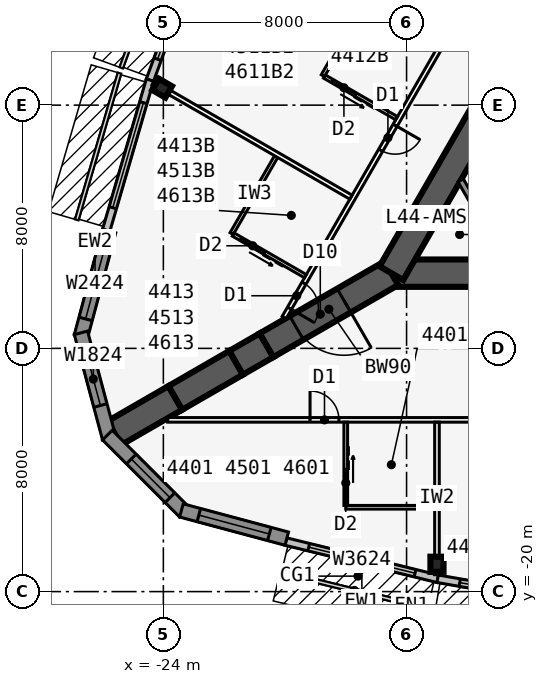
"""IFC4 building model, lengths in metres.
Left out: names, types, materials, properties, quantities, classifications, styles, units other than length and angle.
Written with IfcOpenShell. Run it as: python <this file> out.ifc"""

import sys

from ifc_helpers import new_model, si_unit, direction, frame, frame_2d, origin, origin_2d, place, context, subcontext, project, spatial, polyline, rectangle, i_section, outline, extrude, element, fill, save


model = new_model("IFC4")
c1 = context("Model", 3, precision=1e-05, world=origin(), true_north=direction((0.0, 1.0)))
c2 = subcontext(c1, "Body", "Model", "MODEL_VIEW")
j1 = project(units=[si_unit("LENGTHUNIT", "METRE"), si_unit("PLANEANGLEUNIT", "RADIAN")], contexts=[c1])
p1 = place(None, origin())
s1 = spatial("IfcSite", under=j1, at=p1, CompositionType="ELEMENT")
p2 = place(p1, origin())
s2 = spatial("IfcBuilding", under=s1, at=p2, CompositionType="ELEMENT")
p3 = place(p2, frame((0.0, 0.0, 165.7)))
s3 = spatial("IfcBuildingStorey", under=s2, at=p3, CompositionType="ELEMENT", Elevation=165.7)
p4 = place(p3, frame((-16.5, -9.526, 0.0), z_axis=(0.0, 0.0, 1.0), x_axis=(1.0, 0.0, 0.0)))
e1 = element("IfcWall", 1, at=p4, inside=s3, PredefinedType="SHEAR", context=c2, shape_type="SweptSolid", body=[
    extrude(rectangle(XDim=33.0, YDim=0.9, at=frame_2d((16.5, 0.0))), origin(), (0.0, 0.0, 1.0), 3.4),
])
p5 = place(p4, frame((14.05, 0.0, 0.0)))
e2 = element("IfcOpeningElement", 2, at=p5, cuts=e1, PredefinedType="OPENING", context=c2, shape_type="SweptSolid", body=[
    extrude(rectangle(XDim=1.8, YDim=2.13, at=frame_2d((0.9, 1.065))), frame((0.0, 0.46, 0.0), z_axis=(0.0, -1.0, 0.0), x_axis=(1.0, 0.0, 0.0)), (0.0, 0.0, 1.0), 0.92),
])
p6 = place(p3, frame((0.0, 19.052, 0.0), z_axis=(0.0, 0.0, 1.0), x_axis=(-0.499999749417, -0.866025548458, 0.0)))
e3 = element("IfcWall", 3, at=p6, inside=s3, PredefinedType="SHEAR", context=c2, shape_type="SweptSolid", body=[
    extrude(rectangle(XDim=33.0, YDim=0.9, at=frame_2d((16.5, 0.0))), origin(), (0.0, 0.0, 1.0), 3.4),
])
p7 = place(p6, frame((14.15, 0.0, 0.0)))
e4 = element("IfcOpeningElement", 4, at=p7, cuts=e3, PredefinedType="OPENING", context=c2, shape_type="SweptSolid", body=[
    extrude(rectangle(XDim=1.8, YDim=2.13, at=frame_2d((0.9, 1.065))), frame((0.0, 0.46, 0.0), z_axis=(0.0, -1.0, 0.0), x_axis=(1.0, 0.0, 0.0)), (0.0, 0.0, 1.0), 0.92),
])
p8 = place(p6, frame((12.6, 0.0, 0.0)))
e5 = element("IfcOpeningElement", 5, at=p8, cuts=e3, PredefinedType="OPENING", context=c2, shape_type="SweptSolid", body=[
    extrude(rectangle(XDim=1.0, YDim=2.13, at=frame_2d((0.5, 1.065))), frame((0.0, 0.46, 0.0), z_axis=(0.0, -1.0, 0.0), x_axis=(1.0, 0.0, 0.0)), (0.0, 0.0, 1.0), 0.92),
])
p9 = place(p3, frame((-16.5, -9.526, 0.0), z_axis=(0.0, 0.0, 1.0), x_axis=(-0.866031398331, -0.499989616998, 0.0)))
e6 = element("IfcWall", 6, at=p9, inside=s3, PredefinedType="SHEAR", context=c2, shape_type="SweptSolid", body=[
    extrude(rectangle(XDim=4.746, YDim=0.9, at=frame_2d((2.373, 0.0))), origin(), (0.0, 0.0, 1.0), 3.4),
])
p10 = place(p9, frame((1.8, 0.0, 0.0)))
e7 = element("IfcOpeningElement", 7, at=p10, cuts=e6, PredefinedType="OPENING", context=c2, shape_type="SweptSolid", body=[
    extrude(rectangle(XDim=1.8, YDim=2.13, at=frame_2d((0.9, 1.065))), frame((0.0, 0.46, 0.0), z_axis=(0.0, -1.0, 0.0), x_axis=(1.0, 0.0, 0.0)), (0.0, 0.0, 1.0), 0.92),
])
p11 = place(p3, frame((-20.61, -11.899, 0.0), z_axis=(0.0, 0.0, 1.0), x_axis=(-0.866009537788, -0.500027479704, 0.0)))
e8 = element("IfcWall", 8, at=p11, inside=s3, PredefinedType="SHEAR", context=c2, shape_type="SweptSolid", body=[
    extrude(rectangle(XDim=1.155, YDim=0.9, at=frame_2d((0.577, 0.0))), origin(), (0.0, 0.0, 1.0), 3.4),
])
for number, where, z_axis, x_axis in (
    (9, (-21.61, -12.477, 0.0), (0.0, 0.0, 1.0), (-0.866, -0.5, 0.0)),
    (10, (-23.61, -13.631, 0.0), (0.0, 0.0, 1.0), (-0.866, -0.5, 0.0)),
):
    element("IfcWall", number, at=place(p3, frame(where, z_axis=z_axis, x_axis=x_axis)), inside=s3, PredefinedType="SHEAR", context=c2, shape_type="SweptSolid", body=[
        extrude(rectangle(XDim=2.309, YDim=0.9, at=frame_2d((1.155, 0.0))), origin(), (0.0, 0.0, 1.0), 3.4),
    ])
for number, where, z_axis, x_axis in (
    (11, (-15.0, -19.1, 0.0), (0.0, 0.0, 1.0), (1.0, 0.0, 0.0)),
    (12, (-24.041, -3.44, 0.0), (0.0, 0.0, 1.0), (-0.5, -0.866, 0.0)),
):
    element("IfcColumn", number, at=place(p3, frame(where, z_axis=z_axis, x_axis=x_axis)), inside=s3, PredefinedType="COLUMN", context=c2, shape_type="SweptSolid", body=[
        extrude(i_section(OverallWidth=0.432, OverallDepth=0.498, WebThickness=0.056, FlangeThickness=0.089, at=origin_2d()), origin(), (0.0, 0.0, 1.0), 3.4),
    ])
p12 = place(p3, frame((-19.97, -18.354, 0.0), z_axis=(0.0, 0.0, 1.0), x_axis=(0.971270024053, -0.237980126011, 0.0)))
e13 = element("IfcWall", 13, at=p12, inside=s3, PredefinedType="STANDARD", context=c2, shape_type="SweptSolid", body=[
    extrude(rectangle(XDim=5.148, YDim=0.25, at=frame_2d((2.574, 0.0))), origin(), (0.0, 0.0, 1.0), 3.235),
])
p13 = place(p12, frame((0.774, 0.0, 0.45)))
e14 = element("IfcOpeningElement", 14, at=p13, cuts=e13, PredefinedType="OPENING", context=c2, shape_type="SweptSolid", body=[
    extrude(rectangle(XDim=3.6, YDim=2.4, at=frame_2d((1.8, 1.2))), frame((0.0, 0.135, 0.0), z_axis=(0.0, -1.0, 0.0), x_axis=(1.0, 0.0, 0.0)), (0.0, 0.0, 1.0), 0.27),
])
p14 = place(p3, frame((-14.979, -19.577, 0.0), z_axis=(0.0, 0.0, 1.0), x_axis=(0.985030467156, -0.172380331752, 0.0)))
e15 = element("IfcWall", 15, at=p14, inside=s3, PredefinedType="STANDARD", context=c2, shape_type="SweptSolid", body=[
    extrude(rectangle(XDim=5.076, YDim=0.25, at=frame_2d((2.538, 0.0))), origin(), (0.0, 0.0, 1.0), 3.235),
])
p15 = place(p14, frame((0.738, 0.0, 0.45)))
e16 = element("IfcOpeningElement", 16, at=p15, cuts=e15, PredefinedType="OPENING", context=c2, shape_type="SweptSolid", body=[
    extrude(rectangle(XDim=3.6, YDim=2.4, at=frame_2d((1.8, 1.2))), frame((0.0, 0.135, 0.0), z_axis=(0.0, -1.0, 0.0), x_axis=(1.0, 0.0, 0.0)), (0.0, 0.0, 1.0), 0.27),
])
p16 = place(p3, frame((-22.701, 1.584, 0.0), z_axis=(0.0, 0.0, 1.0), x_axis=(-0.343225593282, -0.939252996863, 0.0)))
e17 = element("IfcWall", 17, at=p16, inside=s3, PredefinedType="STANDARD", context=c2, shape_type="SweptSolid", body=[
    extrude(rectangle(XDim=5.076, YDim=0.25, at=frame_2d((2.538, 0.0))), origin(), (0.0, 0.0, 1.0), 3.235),
])
p17 = place(p16, frame((0.738, 0.0, 0.45)))
e18 = element("IfcOpeningElement", 18, at=p17, cuts=e17, PredefinedType="OPENING", context=c2, shape_type="SweptSolid", body=[
    extrude(rectangle(XDim=3.6, YDim=2.4, at=frame_2d((1.8, 1.2))), frame((0.0, 0.135, 0.0), z_axis=(0.0, -1.0, 0.0), x_axis=(1.0, 0.0, 0.0)), (0.0, 0.0, 1.0), 0.27),
])
p18 = place(p3, frame((-24.441, -3.175, 0.0), z_axis=(0.0, 0.0, 1.0), x_axis=(-0.279528287117, -0.960137457191, 0.0)))
e19 = element("IfcWall", 19, at=p18, inside=s3, PredefinedType="STANDARD", context=c2, shape_type="SweptSolid", body=[
    extrude(rectangle(XDim=5.148, YDim=0.25, at=frame_2d((2.574, 0.0))), origin(), (0.0, 0.0, 1.0), 3.235),
])
p19 = place(p18, frame((0.774, 0.0, 0.45)))
e20 = element("IfcOpeningElement", 20, at=p19, cuts=e19, PredefinedType="OPENING", context=c2, shape_type="SweptSolid", body=[
    extrude(rectangle(XDim=3.6, YDim=2.4, at=frame_2d((1.8, 1.2))), frame((0.0, 0.135, 0.0), z_axis=(0.0, -1.0, 0.0), x_axis=(1.0, 0.0, 0.0)), (0.0, 0.0, 1.0), 0.27),
])
p20 = place(p3, frame((-25.783, -8.141, 0.0), z_axis=(0.0, 0.0, 1.0), x_axis=(-0.258823421857, -0.965924653531, 0.0)))
e21 = element("IfcWall", 21, at=p20, inside=s3, PredefinedType="SOLIDWALL", context=c2, shape_type="SweptSolid", body=[
    extrude(rectangle(XDim=3.586, YDim=0.45, at=frame_2d((1.793, 0.0))), origin(), (0.0, 0.0, 1.0), 3.235),
])
p21 = place(p20, frame((0.593, 0.0, 0.45)))
e22 = element("IfcOpeningElement", 22, at=p21, cuts=e21, PredefinedType="OPENING", context=c2, shape_type="SweptSolid", body=[
    extrude(rectangle(XDim=2.4, YDim=2.4, at=frame_2d((1.2, 1.2))), frame((0.0, 0.235, 0.0), z_axis=(0.0, -1.0, 0.0), x_axis=(1.0, 0.0, 0.0)), (0.0, 0.0, 1.0), 0.47),
])
p22 = place(p3, frame((-26.711, -11.489, 0.0), z_axis=(0.0, 0.0, 1.0), x_axis=(0.258823421857, -0.965924653531, 0.0)))
e23 = element("IfcWall", 23, at=p22, inside=s3, PredefinedType="SOLIDWALL", context=c2, shape_type="SweptSolid", body=[
    extrude(outline(polyline([(3.586, 0.225), (3.527, 0.225), (3.035, 0.093), (3.0, 0.225), (0.0, 0.225), (0.0, -0.225), (3.586, -0.225), (3.586, 0.225)])), origin(), (0.0, 0.0, 1.0), 3.235),
])
p23 = place(p22, frame((0.675, 0.0, 0.45)))
e24 = element("IfcOpeningElement", 24, at=p23, cuts=e23, PredefinedType="OPENING", context=c2, shape_type="SweptSolid", body=[
    extrude(rectangle(XDim=1.8, YDim=2.4, at=frame_2d((0.9, 1.2))), frame((0.0, 0.235, 0.0), z_axis=(0.0, -1.0, 0.0), x_axis=(1.0, 0.0, 0.0)), (0.0, 0.0, 1.0), 0.47),
])
p24 = place(p3, frame((-25.841, -14.852, 0.0), z_axis=(0.0, 0.0, 1.0), x_axis=(0.707106781187, -0.707106781187, 0.0)))
e25 = element("IfcWall", 25, at=p24, inside=s3, PredefinedType="SOLIDWALL", context=c2, shape_type="SweptSolid", body=[
    extrude(outline(polyline([(3.586, 0.225), (0.586, 0.225), (0.551, 0.093), (0.059, 0.225), (0.0, 0.225), (0.0, -0.225), (3.586, -0.225), (3.586, 0.225)])), origin(), (0.0, 0.0, 1.0), 3.235),
])
p25 = place(p24, frame((1.111, 0.0, 0.45)))
e26 = element("IfcOpeningElement", 26, at=p25, cuts=e25, PredefinedType="OPENING", context=c2, shape_type="SweptSolid", body=[
    extrude(rectangle(XDim=1.8, YDim=2.4, at=frame_2d((0.9, 1.2))), frame((0.0, 0.235, 0.0), z_axis=(0.0, -1.0, 0.0), x_axis=(1.0, 0.0, 0.0)), (0.0, 0.0, 1.0), 0.47),
])
p26 = place(p3, frame((-23.406, -17.33, 0.0), z_axis=(0.0, 0.0, 1.0), x_axis=(0.965924653531, -0.258823421857, 0.0)))
e27 = element("IfcWall", 27, at=p26, inside=s3, PredefinedType="SOLIDWALL", context=c2, shape_type="SweptSolid", body=[
    extrude(rectangle(XDim=3.586, YDim=0.45, at=frame_2d((1.793, 0.0))), origin(), (0.0, 0.0, 1.0), 3.235),
])
p27 = place(p26, frame((0.593, 0.0, 0.45)))
e28 = element("IfcOpeningElement", 28, at=p27, cuts=e27, PredefinedType="OPENING", context=c2, shape_type="SweptSolid", body=[
    extrude(rectangle(XDim=2.4, YDim=2.4, at=frame_2d((1.2, 1.2))), frame((0.0, 0.235, 0.0), z_axis=(0.0, -1.0, 0.0), x_axis=(1.0, 0.0, 0.0)), (0.0, 0.0, 1.0), 0.47),
])
p28 = place(p3, frame((-23.857, -14.351, 0.0), z_axis=(0.0, 0.0, 1.0), x_axis=(1.0, 0.0, 0.0)))
e29 = element("IfcWall", 29, at=p28, inside=s3, PredefinedType="PARTITIONING", context=c2, shape_type="SweptSolid", body=[
    extrude(rectangle(XDim=47.714, YDim=0.15, at=frame_2d((23.857, 0.0))), origin(), (0.0, 0.0, 1.0), 3.235),
])
p29 = place(p28, frame((4.682, 0.0, 0.0)))
e30 = element("IfcOpeningElement", 30, at=p29, cuts=e29, PredefinedType="OPENING", context=c2, shape_type="SweptSolid", body=[
    extrude(rectangle(XDim=0.95, YDim=2.13, at=frame_2d((0.475, 1.065))), frame((0.0, 0.085, 0.0), z_axis=(0.0, -1.0, 0.0), x_axis=(1.0, 0.0, 0.0)), (0.0, 0.0, 1.0), 0.17),
])
p30 = place(p28, frame((11.382, 0.0, 0.0)))
e31 = element("IfcOpeningElement", 31, at=p30, cuts=e29, PredefinedType="OPENING", context=c2, shape_type="SweptSolid", body=[
    extrude(rectangle(XDim=0.95, YDim=2.13, at=frame_2d((0.475, 1.065))), frame((0.0, 0.085, 0.0), z_axis=(0.0, -1.0, 0.0), x_axis=(1.0, 0.0, 0.0)), (0.0, 0.0, 1.0), 0.17),
])
p31 = place(p28, frame((23.357, 0.0, 0.0)))
e32 = element("IfcOpeningElement", 32, at=p31, cuts=e29, PredefinedType="OPENING", context=c2, shape_type="SweptSolid", body=[
    extrude(rectangle(XDim=1.0, YDim=2.13, at=frame_2d((0.5, 1.065))), frame((0.0, 0.085, 0.0), z_axis=(0.0, -1.0, 0.0), x_axis=(1.0, 0.0, 0.0)), (0.0, 0.0, 1.0), 0.17),
])
p32 = place(p28, frame((30.082, 0.0, 0.0)))
e33 = element("IfcOpeningElement", 33, at=p32, cuts=e29, PredefinedType="OPENING", context=c2, shape_type="SweptSolid", body=[
    extrude(rectangle(XDim=0.95, YDim=2.13, at=frame_2d((0.475, 1.065))), frame((0.0, 0.085, 0.0), z_axis=(0.0, -1.0, 0.0), x_axis=(1.0, 0.0, 0.0)), (0.0, 0.0, 1.0), 0.17),
])
p33 = place(p28, frame((43.041, 0.0, 0.0)))
e34 = element("IfcOpeningElement", 34, at=p33, cuts=e29, PredefinedType="OPENING", context=c2, shape_type="SweptSolid", body=[
    extrude(rectangle(XDim=0.95, YDim=2.13, at=frame_2d((0.475, 1.065))), frame((0.0, 0.085, 0.0), z_axis=(0.0, -1.0, 0.0), x_axis=(1.0, 0.0, 0.0)), (0.0, 0.0, 1.0), 0.17),
])
p34 = place(p3, frame((-15.0, -14.426, 0.0), z_axis=(0.0, 0.0, 1.0), x_axis=(0.0, -1.0, 0.0)))
e35 = element("IfcWall", 35, at=p34, inside=s3, PredefinedType="PARTITIONING", context=c2, shape_type="SweptSolid", body=[
    extrude(rectangle(XDim=5.017, YDim=0.15, at=frame_2d((2.508, 0.0))), origin(), (0.0, 0.0, 1.0), 2.389),
])
p35 = place(p3, frame((-18.0, -17.226, 0.0), z_axis=(0.0, 0.0, 1.0), x_axis=(1.0, 0.0, 0.0)))
e36 = element("IfcWall", 36, at=p35, inside=s3, PredefinedType="PLUMBINGWALL", context=c2, shape_type="SweptSolid", body=[
    extrude(rectangle(XDim=3.0, YDim=0.12, at=frame_2d((1.5, 0.0))), origin(), (0.0, 0.0, 1.0), 3.235),
])
p36 = place(p3, frame((-18.0, -14.426, 0.0), z_axis=(0.0, 0.0, 1.0), x_axis=(0.0, -1.0, 0.0)))
e37 = element("IfcWall", 37, at=p36, inside=s3, PredefinedType="PLUMBINGWALL", context=c2, shape_type="SweptSolid", body=[
    extrude(rectangle(XDim=2.74, YDim=0.12, at=frame_2d((1.37, 0.0))), origin(), (0.0, 0.0, 1.0), 3.235),
])
p37 = place(p36, frame((1.55, 0.0, 0.0)))
e38 = element("IfcOpeningElement", 38, at=p37, cuts=e37, PredefinedType="OPENING", context=c2, shape_type="SweptSolid", body=[
    extrude(rectangle(XDim=0.9, YDim=2.13, at=frame_2d((0.45, 1.065))), frame((0.0, 0.07, 0.0), z_axis=(0.0, -1.0, 0.0), x_axis=(1.0, 0.0, 0.0)), (0.0, 0.0, 1.0), 0.14),
])
p38 = place(p3, frame((-0.5, 22.836, 0.0), z_axis=(0.0, 0.0, 1.0), x_axis=(-0.500001677587, -0.866024435227, 0.0)))
e39 = element("IfcWall", 39, at=p38, inside=s3, PredefinedType="PARTITIONING", context=c2, shape_type="SweptSolid", body=[
    extrude(rectangle(XDim=39.054, YDim=0.15, at=frame_2d((19.527, 0.0))), origin(), (0.0, 0.0, 1.0), 3.235),
])
p39 = place(p38, frame((1.558, 0.0, 0.0)))
e40 = element("IfcOpeningElement", 40, at=p39, cuts=e39, PredefinedType="OPENING", context=c2, shape_type="SweptSolid", body=[
    extrude(rectangle(XDim=0.95, YDim=2.13, at=frame_2d((0.475, 1.065))), frame((0.0, 0.085, 0.0), z_axis=(0.0, -1.0, 0.0), x_axis=(1.0, 0.0, 0.0)), (0.0, 0.0, 1.0), 0.17),
])
p40 = place(p38, frame((19.052, 0.0, 0.0)))
e41 = element("IfcOpeningElement", 41, at=p40, cuts=e39, PredefinedType="OPENING", context=c2, shape_type="SweptSolid", body=[
    extrude(rectangle(XDim=0.95, YDim=2.13, at=frame_2d((0.475, 1.065))), frame((0.0, 0.085, 0.0), z_axis=(0.0, -1.0, 0.0), x_axis=(1.0, 0.0, 0.0)), (0.0, 0.0, 1.0), 0.17),
])
p41 = place(p38, frame((31.752, 0.0, 0.0)))
e42 = element("IfcOpeningElement", 42, at=p41, cuts=e39, PredefinedType="OPENING", context=c2, shape_type="SweptSolid", body=[
    extrude(rectangle(XDim=0.95, YDim=2.13, at=frame_2d((0.475, 1.065))), frame((0.0, 0.085, 0.0), z_axis=(0.0, -1.0, 0.0), x_axis=(1.0, 0.0, 0.0)), (0.0, 0.0, 1.0), 0.17),
])
p42 = place(p38, frame((37.752, 0.0, 0.0)))
e43 = element("IfcOpeningElement", 43, at=p42, cuts=e39, PredefinedType="OPENING", context=c2, shape_type="SweptSolid", body=[
    extrude(rectangle(XDim=0.95, YDim=2.13, at=frame_2d((0.475, 1.065))), frame((0.0, 0.085, 0.0), z_axis=(0.0, -1.0, 0.0), x_axis=(1.0, 0.0, 0.0)), (0.0, 0.0, 1.0), 0.17),
])
p43 = place(p3, frame((-17.829, -7.027, 0.0), z_axis=(0.0, 0.0, 1.0), x_axis=(-0.866029804378, 0.499992377871, 0.0)))
e44 = element("IfcWall", 44, at=p43, inside=s3, PredefinedType="PARTITIONING", context=c2, shape_type="SweptSolid", body=[
    extrude(rectangle(XDim=7.516, YDim=0.15, at=frame_2d((3.758, 0.0))), origin(), (0.0, 0.0, 1.0), 2.389),
])
p44 = place(p3, frame((-17.253, -0.431, 0.0), z_axis=(0.0, 0.0, 1.0), x_axis=(-0.499990139034, -0.866031096941, 0.0)))
e45 = element("IfcWall", 45, at=p44, inside=s3, PredefinedType="PLUMBINGWALL", context=c2, shape_type="SweptSolid", body=[
    extrude(rectangle(XDim=3.0, YDim=0.12, at=frame_2d((1.5, 0.0))), origin(), (0.0, 0.0, 1.0), 3.235),
])
p45 = place(p3, frame((-16.329, -4.429, 0.0), z_axis=(0.0, 0.0, 1.0), x_axis=(-0.865997131366, 0.500048966069, 0.0)))
e46 = element("IfcWall", 46, at=p45, inside=s3, PredefinedType="PLUMBINGWALL", context=c2, shape_type="SweptSolid", body=[
    extrude(rectangle(XDim=2.74, YDim=0.12, at=frame_2d((1.37, 0.0))), origin(), (0.0, 0.0, 1.0), 3.235),
])
p46 = place(p45, frame((1.55, 0.0, 0.0)))
e47 = element("IfcOpeningElement", 47, at=p46, cuts=e46, PredefinedType="OPENING", context=c2, shape_type="SweptSolid", body=[
    extrude(rectangle(XDim=0.9, YDim=2.13, at=frame_2d((0.45, 1.065))), frame((0.0, 0.07, 0.0), z_axis=(0.0, -1.0, 0.0), x_axis=(1.0, 0.0, 0.0)), (0.0, 0.0, 1.0), 0.14),
])
p47 = place(p3, frame((-20.253, -5.627, 0.0), z_axis=(0.0, 0.0, 1.0), x_axis=(-0.499990139034, -0.866031096941, 0.0)))
e48 = element("IfcWall", 48, at=p47, inside=s3, PredefinedType="PLUMBINGWALL", context=c2, shape_type="SweptSolid", body=[
    extrude(rectangle(XDim=3.0, YDim=0.12, at=frame_2d((1.5, 0.0))), origin(), (0.0, 0.0, 1.0), 3.235),
])
p48 = place(p3, frame((-19.329, -9.625, 0.0), z_axis=(0.0, 0.0, 1.0), x_axis=(-0.866035715982, 0.499982138324, 0.0)))
e49 = element("IfcWall", 49, at=p48, inside=s3, PredefinedType="PLUMBINGWALL", context=c2, shape_type="SweptSolid", body=[
    extrude(rectangle(XDim=2.74, YDim=0.12, at=frame_2d((1.37, 0.0))), origin(), (0.0, 0.0, 1.0), 3.235),
])
p49 = place(p48, frame((1.55, 0.0, 0.0)))
e50 = element("IfcOpeningElement", 50, at=p49, cuts=e49, PredefinedType="OPENING", context=c2, shape_type="SweptSolid", body=[
    extrude(rectangle(XDim=0.9, YDim=2.13, at=frame_2d((0.45, 1.065))), frame((0.0, 0.07, 0.0), z_axis=(0.0, -1.0, 0.0), x_axis=(1.0, 0.0, 0.0)), (0.0, 0.0, 1.0), 0.14),
])
p50 = place(p3, frame((-12.719, -9.076, 0.0), z_axis=(0.0, 0.0, 1.0), x_axis=(-0.499952404951, 0.866052881055, 0.0)))
e51 = element("IfcWall", 51, at=p50, inside=s3, PredefinedType="SOLIDWALL", context=c2, shape_type="SweptSolid", body=[
    extrude(rectangle(XDim=3.002, YDim=0.2, at=frame_2d((1.501, 0.0))), origin(), (0.0, 0.0, 1.0), 3.235),
])
p51 = place(p13, origin())
e52 = element("IfcWindow", 52, at=p51, inside=s3, PartitioningType="SINGLE_PANEL", PredefinedType="WINDOW", context=c2, shape_type="SweptSolid", body=[
    extrude(rectangle(XDim=3.6, YDim=2.4, at=frame_2d((1.8, 1.2))), frame((0.0, 0.03, 0.0), z_axis=(0.0, -1.0, 0.0), x_axis=(1.0, 0.0, 0.0)), (0.0, 0.0, 1.0), 0.06),
])
fill(e14, e52)
p52 = place(p15, origin())
e53 = element("IfcWindow", 53, at=p52, inside=s3, PartitioningType="SINGLE_PANEL", PredefinedType="WINDOW", context=c2, shape_type="SweptSolid", body=[
    extrude(rectangle(XDim=3.6, YDim=2.4, at=frame_2d((1.8, 1.2))), frame((0.0, 0.03, 0.0), z_axis=(0.0, -1.0, 0.0), x_axis=(1.0, 0.0, 0.0)), (0.0, 0.0, 1.0), 0.06),
])
fill(e16, e53)
p53 = place(p17, origin())
e54 = element("IfcWindow", 54, at=p53, inside=s3, PartitioningType="SINGLE_PANEL", PredefinedType="WINDOW", context=c2, shape_type="SweptSolid", body=[
    extrude(rectangle(XDim=3.6, YDim=2.4, at=frame_2d((1.8, 1.2))), frame((0.0, 0.03, 0.0), z_axis=(0.0, -1.0, 0.0), x_axis=(1.0, 0.0, 0.0)), (0.0, 0.0, 1.0), 0.06),
])
fill(e18, e54)
p54 = place(p19, origin())
e55 = element("IfcWindow", 55, at=p54, inside=s3, PartitioningType="SINGLE_PANEL", PredefinedType="WINDOW", context=c2, shape_type="SweptSolid", body=[
    extrude(rectangle(XDim=3.6, YDim=2.4, at=frame_2d((1.8, 1.2))), frame((0.0, 0.03, 0.0), z_axis=(0.0, -1.0, 0.0), x_axis=(1.0, 0.0, 0.0)), (0.0, 0.0, 1.0), 0.06),
])
fill(e20, e55)
p55 = place(p21, origin())
e56 = element("IfcWindow", 56, at=p55, inside=s3, PartitioningType="SINGLE_PANEL", PredefinedType="WINDOW", context=c2, shape_type="SweptSolid", body=[
    extrude(rectangle(XDim=2.4, YDim=2.4, at=frame_2d((1.2, 1.2))), frame((0.0, 0.03, 0.0), z_axis=(0.0, -1.0, 0.0), x_axis=(1.0, 0.0, 0.0)), (0.0, 0.0, 1.0), 0.06),
])
fill(e22, e56)
p56 = place(p23, origin())
e57 = element("IfcWindow", 57, at=p56, inside=s3, PartitioningType="SINGLE_PANEL", PredefinedType="WINDOW", context=c2, shape_type="SweptSolid", body=[
    extrude(rectangle(XDim=1.8, YDim=2.4, at=frame_2d((0.9, 1.2))), frame((0.0, 0.03, 0.0), z_axis=(0.0, -1.0, 0.0), x_axis=(1.0, 0.0, 0.0)), (0.0, 0.0, 1.0), 0.06),
])
fill(e24, e57)
p57 = place(p25, origin())
e58 = element("IfcWindow", 58, at=p57, inside=s3, PartitioningType="SINGLE_PANEL", PredefinedType="WINDOW", context=c2, shape_type="SweptSolid", body=[
    extrude(rectangle(XDim=1.8, YDim=2.4, at=frame_2d((0.9, 1.2))), frame((0.0, 0.03, 0.0), z_axis=(0.0, -1.0, 0.0), x_axis=(1.0, 0.0, 0.0)), (0.0, 0.0, 1.0), 0.06),
])
fill(e26, e58)
p58 = place(p27, origin())
e59 = element("IfcWindow", 59, at=p58, inside=s3, PartitioningType="SINGLE_PANEL", PredefinedType="WINDOW", context=c2, shape_type="SweptSolid", body=[
    extrude(rectangle(XDim=2.4, YDim=2.4, at=frame_2d((1.2, 1.2))), frame((0.0, 0.03, 0.0), z_axis=(0.0, -1.0, 0.0), x_axis=(1.0, 0.0, 0.0)), (0.0, 0.0, 1.0), 0.06),
])
fill(e28, e59)
p59 = place(p37, origin())
e60 = element("IfcDoor", 60, at=p59, inside=s3, OperationType="SLIDING_TO_LEFT", PredefinedType="DOOR", context=c2, shape_type="SweptSolid", body=[
    extrude(rectangle(XDim=0.9, YDim=2.13, at=frame_2d((0.45, 1.065))), frame((0.0, 0.025, 0.0), z_axis=(0.0, -1.0, 0.0), x_axis=(1.0, 0.0, 0.0)), (0.0, 0.0, 1.0), 0.05),
])
fill(e38, e60)
p60 = place(p29, origin())
e61 = element("IfcDoor", 61, at=p60, inside=s3, OperationType="SINGLE_SWING_LEFT", PredefinedType="DOOR", context=c2, shape_type="SweptSolid", body=[
    extrude(rectangle(XDim=0.95, YDim=2.13, at=frame_2d((0.475, 1.065))), frame((0.0, 0.025, 0.0), z_axis=(0.0, -1.0, 0.0), x_axis=(1.0, 0.0, 0.0)), (0.0, 0.0, 1.0), 0.05),
])
fill(e30, e61)
p61 = place(p46, origin())
e62 = element("IfcDoor", 62, at=p61, inside=s3, OperationType="SLIDING_TO_LEFT", PredefinedType="DOOR", context=c2, shape_type="SweptSolid", body=[
    extrude(rectangle(XDim=0.9, YDim=2.13, at=frame_2d((0.45, 1.065))), frame((0.0, 0.025, 0.0), z_axis=(0.0, -1.0, 0.0), x_axis=(1.0, 0.0, 0.0)), (0.0, 0.0, 1.0), 0.05),
])
fill(e47, e62)
p62 = place(p41, origin())
e63 = element("IfcDoor", 63, at=p62, inside=s3, OperationType="SINGLE_SWING_LEFT", PredefinedType="DOOR", context=c2, shape_type="SweptSolid", body=[
    extrude(rectangle(XDim=0.95, YDim=2.13, at=frame_2d((0.475, 1.065))), frame((0.0, 0.025, 0.0), z_axis=(0.0, -1.0, 0.0), x_axis=(1.0, 0.0, 0.0)), (0.0, 0.0, 1.0), 0.05),
])
fill(e42, e63)
p63 = place(p49, origin())
e64 = element("IfcDoor", 64, at=p63, inside=s3, OperationType="SLIDING_TO_LEFT", PredefinedType="DOOR", context=c2, shape_type="SweptSolid", body=[
    extrude(rectangle(XDim=0.9, YDim=2.13, at=frame_2d((0.45, 1.065))), frame((0.0, 0.025, 0.0), z_axis=(0.0, -1.0, 0.0), x_axis=(1.0, 0.0, 0.0)), (0.0, 0.0, 1.0), 0.05),
])
fill(e50, e64)
p64 = place(p42, origin())
e65 = element("IfcDoor", 65, at=p64, inside=s3, OperationType="SINGLE_SWING_RIGHT", PredefinedType="DOOR", context=c2, shape_type="SweptSolid", body=[
    extrude(rectangle(XDim=0.95, YDim=2.13, at=frame_2d((0.475, 1.065))), frame((0.0, 0.025, 0.0), z_axis=(0.0, -1.0, 0.0), x_axis=(1.0, 0.0, 0.0)), (0.0, 0.0, 1.0), 0.05),
])
fill(e43, e65)
p65 = place(p10, origin())
e66 = element("IfcDoor", 66, at=p65, inside=s3, OperationType="DOUBLE_DOOR_DOUBLE_SWING", PredefinedType="DOOR", context=c2, shape_type="SweptSolid", body=[
    extrude(rectangle(XDim=1.8, YDim=2.13, at=frame_2d((0.9, 1.065))), frame((0.0, 0.025, 0.0), z_axis=(0.0, -1.0, 0.0), x_axis=(1.0, 0.0, 0.0)), (0.0, 0.0, 1.0), 0.05),
])
fill(e7, e66)
save(model, sys.argv[1])
